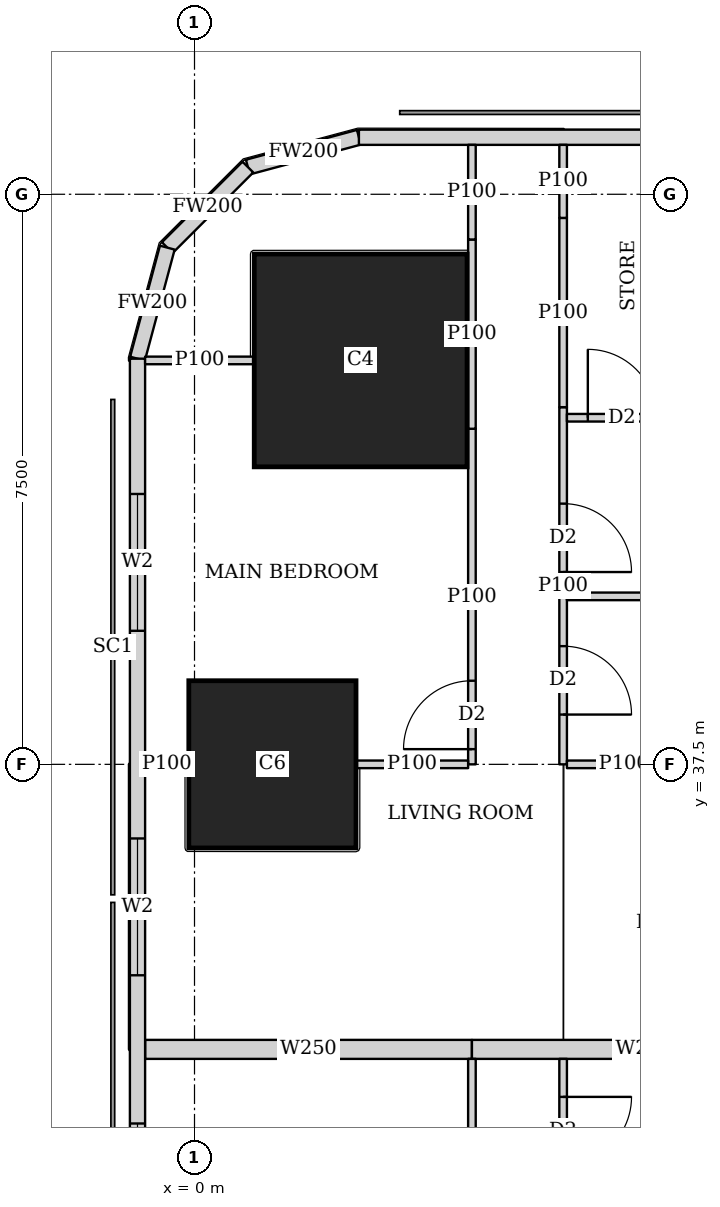
"""IFC4 building model, lengths in metres.
Left out: names, types, materials, properties, quantities, classifications, styles, units other than length and angle.
Written with IfcOpenShell. Run it as: python <this file> out.ifc"""

import sys

from ifc_helpers import new_model, si_unit, direction, frame, frame_2d, origin, origin_2d, place, context, subcontext, project, spatial, rectangle, extrude, element, fill, save


model = new_model("IFC4")
c1 = context("Model", 3, precision=1e-05, world=origin(), true_north=direction((0.0, 1.0)))
c2 = subcontext(c1, "Body", "Model", "MODEL_VIEW")
j1 = project(units=[si_unit("LENGTHUNIT", "METRE"), si_unit("PLANEANGLEUNIT", "RADIAN")], contexts=[c1])
p1 = place(None, origin())
s1 = spatial("IfcSite", under=j1, at=p1, CompositionType="ELEMENT")
p2 = place(p1, origin())
s2 = spatial("IfcBuilding", under=s1, at=p2, CompositionType="ELEMENT")
p3 = place(p2, frame((0.0, 0.0, 77.9)))
s3 = spatial("IfcBuildingStorey", under=s2, at=p3, CompositionType="ELEMENT", Elevation=77.9)
p4 = place(p3, frame((1.025, 37.5, 0.0), z_axis=(0.0, 0.0, 1.0), x_axis=(1.0, 0.0, 0.0)))
e1 = element("IfcColumn", 1, at=p4, inside=s3, PredefinedType="COLUMN", context=c2, shape_type="SweptSolid", body=[
    extrude(rectangle(XDim=2.2, YDim=2.2, at=origin_2d()), origin(), (0.0, 0.0, 1.0), 3.75),
])
p5 = place(p3, frame((2.186, 42.814, 0.0), z_axis=(0.0, 0.0, 1.0), x_axis=(1.0, 0.0, 0.0)))
e2 = element("IfcColumn", 2, at=p5, inside=s3, PredefinedType="COLUMN", context=c2, shape_type="SweptSolid", body=[
    extrude(rectangle(XDim=2.8, YDim=2.8, at=origin_2d()), origin(), (0.0, 0.0, 1.0), 3.75),
])
p6 = place(p3, frame((40.106, 45.75, 0.0), z_axis=(0.0, 0.0, 1.0), x_axis=(-1.0, 0.0, 0.0)))
e3 = element("IfcWall", 3, at=p6, inside=s3, PredefinedType="SOLIDWALL", context=c2, shape_type="SweptSolid", body=[
    extrude(rectangle(XDim=37.943, YDim=0.2, at=frame_2d((18.971, 0.0))), origin(), (0.0, 0.0, 1.0), 3.5),
])
p7 = place(p6, frame((8.606, 0.0, 0.9)))
e4 = element("IfcOpeningElement", 4, at=p7, cuts=e3, PredefinedType="OPENING", context=c2, shape_type="SweptSolid", body=[
    extrude(rectangle(XDim=1.8, YDim=1.5, at=frame_2d((0.9, 0.75))), frame((0.0, 0.11, 0.0), z_axis=(0.0, -1.0, 0.0), x_axis=(1.0, 0.0, 0.0)), (0.0, 0.0, 1.0), 0.22),
])
p8 = place(p6, frame((12.206, 0.0, 0.9)))
e5 = element("IfcOpeningElement", 5, at=p8, cuts=e3, PredefinedType="OPENING", context=c2, shape_type="SweptSolid", body=[
    extrude(rectangle(XDim=1.8, YDim=1.5, at=frame_2d((0.9, 0.75))), frame((0.0, 0.11, 0.0), z_axis=(0.0, -1.0, 0.0), x_axis=(1.0, 0.0, 0.0)), (0.0, 0.0, 1.0), 0.22),
])
p9 = place(p6, frame((15.806, 0.0, 0.9)))
e6 = element("IfcOpeningElement", 6, at=p9, cuts=e3, PredefinedType="OPENING", context=c2, shape_type="SweptSolid", body=[
    extrude(rectangle(XDim=1.8, YDim=1.5, at=frame_2d((0.9, 0.75))), frame((0.0, 0.11, 0.0), z_axis=(0.0, -1.0, 0.0), x_axis=(1.0, 0.0, 0.0)), (0.0, 0.0, 1.0), 0.22),
])
p10 = place(p6, frame((19.406, 0.0, 0.9)))
e7 = element("IfcOpeningElement", 7, at=p10, cuts=e3, PredefinedType="OPENING", context=c2, shape_type="SweptSolid", body=[
    extrude(rectangle(XDim=1.8, YDim=1.5, at=frame_2d((0.9, 0.75))), frame((0.0, 0.11, 0.0), z_axis=(0.0, -1.0, 0.0), x_axis=(1.0, 0.0, 0.0)), (0.0, 0.0, 1.0), 0.22),
])
p11 = place(p6, frame((23.006, 0.0, 0.9)))
e8 = element("IfcOpeningElement", 8, at=p11, cuts=e3, PredefinedType="OPENING", context=c2, shape_type="SweptSolid", body=[
    extrude(rectangle(XDim=1.8, YDim=1.5, at=frame_2d((0.9, 0.75))), frame((0.0, 0.11, 0.0), z_axis=(0.0, -1.0, 0.0), x_axis=(1.0, 0.0, 0.0)), (0.0, 0.0, 1.0), 0.22),
])
p12 = place(p6, frame((26.606, 0.0, 0.9)))
e9 = element("IfcOpeningElement", 9, at=p12, cuts=e3, PredefinedType="OPENING", context=c2, shape_type="SweptSolid", body=[
    extrude(rectangle(XDim=1.8, YDim=1.5, at=frame_2d((0.9, 0.75))), frame((0.0, 0.11, 0.0), z_axis=(0.0, -1.0, 0.0), x_axis=(1.0, 0.0, 0.0)), (0.0, 0.0, 1.0), 0.22),
])
p13 = place(p3, frame((2.163, 45.75, 0.0), z_axis=(0.0, 0.0, 1.0), x_axis=(-0.965832000415, -0.259168954497, 0.0)))
e10 = element("IfcWall", 10, at=p13, inside=s3, PredefinedType="SOLIDWALL", context=c2, shape_type="SweptSolid", body=[
    extrude(rectangle(XDim=1.513, YDim=0.2, at=frame_2d((0.756, 0.0))), origin(), (0.0, 0.0, 1.0), 3.5),
])
p14 = place(p3, frame((0.702, 45.358, 0.0), z_axis=(0.0, 0.0, 1.0), x_axis=(-0.707106781187, -0.707106781187, 0.0)))
e11 = element("IfcWall", 11, at=p14, inside=s3, PredefinedType="SOLIDWALL", context=c2, shape_type="SweptSolid", body=[
    extrude(rectangle(XDim=1.499, YDim=0.2, at=frame_2d((0.75, 0.0))), origin(), (0.0, 0.0, 1.0), 3.5),
])
p15 = place(p3, frame((-0.358, 44.298, 0.0), z_axis=(0.0, 0.0, 1.0), x_axis=(-0.259168954497, -0.965832000415, 0.0)))
e12 = element("IfcWall", 12, at=p15, inside=s3, PredefinedType="SOLIDWALL", context=c2, shape_type="SweptSolid", body=[
    extrude(rectangle(XDim=1.513, YDim=0.2, at=frame_2d((0.756, 0.0))), origin(), (0.0, 0.0, 1.0), 3.5),
])
p16 = place(p3, frame((-0.75, 42.837, 0.0), z_axis=(0.0, 0.0, 1.0), x_axis=(0.0, -1.0, 0.0)))
e13 = element("IfcWall", 13, at=p16, inside=s3, PredefinedType="SOLIDWALL", context=c2, shape_type="SweptSolid", body=[
    extrude(rectangle(XDim=40.674, YDim=0.2, at=frame_2d((20.337, 0.0))), origin(), (0.0, 0.0, 1.0), 3.5),
])
p17 = place(p16, frame((1.78, 0.0, 0.9)))
e14 = element("IfcOpeningElement", 14, at=p17, cuts=e13, PredefinedType="OPENING", context=c2, shape_type="SweptSolid", body=[
    extrude(rectangle(XDim=1.8, YDim=1.5, at=frame_2d((0.9, 0.75))), frame((0.0, 0.11, 0.0), z_axis=(0.0, -1.0, 0.0), x_axis=(1.0, 0.0, 0.0)), (0.0, 0.0, 1.0), 0.22),
])
p18 = place(p16, frame((6.312, 0.0, 0.9)))
e15 = element("IfcOpeningElement", 15, at=p18, cuts=e13, PredefinedType="OPENING", context=c2, shape_type="SweptSolid", body=[
    extrude(rectangle(XDim=1.8, YDim=1.5, at=frame_2d((0.9, 0.75))), frame((0.0, 0.11, 0.0), z_axis=(0.0, -1.0, 0.0), x_axis=(1.0, 0.0, 0.0)), (0.0, 0.0, 1.0), 0.22),
])
p19 = place(p16, frame((10.062, 0.0, 0.9)))
e16 = element("IfcOpeningElement", 16, at=p19, cuts=e13, PredefinedType="OPENING", context=c2, shape_type="SweptSolid", body=[
    extrude(rectangle(XDim=1.8, YDim=1.5, at=frame_2d((0.9, 0.75))), frame((0.0, 0.11, 0.0), z_axis=(0.0, -1.0, 0.0), x_axis=(1.0, 0.0, 0.0)), (0.0, 0.0, 1.0), 0.22),
])
p20 = place(p16, frame((13.812, 0.0, 0.9)))
e17 = element("IfcOpeningElement", 17, at=p20, cuts=e13, PredefinedType="OPENING", context=c2, shape_type="SweptSolid", body=[
    extrude(rectangle(XDim=1.8, YDim=1.5, at=frame_2d((0.9, 0.75))), frame((0.0, 0.11, 0.0), z_axis=(0.0, -1.0, 0.0), x_axis=(1.0, 0.0, 0.0)), (0.0, 0.0, 1.0), 0.22),
])
p21 = place(p16, frame((17.562, 0.0, 0.9)))
e18 = element("IfcOpeningElement", 18, at=p21, cuts=e13, PredefinedType="OPENING", context=c2, shape_type="SweptSolid", body=[
    extrude(rectangle(XDim=1.8, YDim=1.5, at=frame_2d((0.9, 0.75))), frame((0.0, 0.11, 0.0), z_axis=(0.0, -1.0, 0.0), x_axis=(1.0, 0.0, 0.0)), (0.0, 0.0, 1.0), 0.22),
])
p22 = place(p16, frame((21.312, 0.0, 0.9)))
e19 = element("IfcOpeningElement", 19, at=p22, cuts=e13, PredefinedType="OPENING", context=c2, shape_type="SweptSolid", body=[
    extrude(rectangle(XDim=1.8, YDim=1.5, at=frame_2d((0.9, 0.75))), frame((0.0, 0.11, 0.0), z_axis=(0.0, -1.0, 0.0), x_axis=(1.0, 0.0, 0.0)), (0.0, 0.0, 1.0), 0.22),
])
p23 = place(p16, frame((25.062, 0.0, 0.9)))
e20 = element("IfcOpeningElement", 20, at=p23, cuts=e13, PredefinedType="OPENING", context=c2, shape_type="SweptSolid", body=[
    extrude(rectangle(XDim=1.8, YDim=1.5, at=frame_2d((0.9, 0.75))), frame((0.0, 0.11, 0.0), z_axis=(0.0, -1.0, 0.0), x_axis=(1.0, 0.0, 0.0)), (0.0, 0.0, 1.0), 0.22),
])
p24 = place(p16, frame((28.812, 0.0, 0.9)))
e21 = element("IfcOpeningElement", 21, at=p24, cuts=e13, PredefinedType="OPENING", context=c2, shape_type="SweptSolid", body=[
    extrude(rectangle(XDim=1.8, YDim=1.5, at=frame_2d((0.9, 0.75))), frame((0.0, 0.11, 0.0), z_axis=(0.0, -1.0, 0.0), x_axis=(1.0, 0.0, 0.0)), (0.0, 0.0, 1.0), 0.22),
])
p25 = place(p16, frame((32.562, 0.0, 0.9)))
e22 = element("IfcOpeningElement", 22, at=p25, cuts=e13, PredefinedType="OPENING", context=c2, shape_type="SweptSolid", body=[
    extrude(rectangle(XDim=1.8, YDim=1.5, at=frame_2d((0.9, 0.75))), frame((0.0, 0.11, 0.0), z_axis=(0.0, -1.0, 0.0), x_axis=(1.0, 0.0, 0.0)), (0.0, 0.0, 1.0), 0.22),
])
p26 = place(p16, frame((37.094, 0.0, 0.9)))
e23 = element("IfcOpeningElement", 23, at=p26, cuts=e13, PredefinedType="OPENING", context=c2, shape_type="SweptSolid", body=[
    extrude(rectangle(XDim=1.8, YDim=1.5, at=frame_2d((0.9, 0.75))), frame((0.0, 0.11, 0.0), z_axis=(0.0, -1.0, 0.0), x_axis=(1.0, 0.0, 0.0)), (0.0, 0.0, 1.0), 0.22),
])
p27 = place(p3, frame((3.65, 26.25, 0.0), z_axis=(0.0, 0.0, 1.0), x_axis=(0.0, 1.0, 0.0)))
e24 = element("IfcWall", 24, at=p27, inside=s3, PredefinedType="PARTITIONING", context=c2, shape_type="SweptSolid", body=[
    extrude(rectangle(XDim=7.375, YDim=0.1, at=frame_2d((3.688, 0.0))), origin(), (0.0, 0.0, 1.0), 3.5),
])
p28 = place(p27, frame((0.2, 0.0, 0.0)))
e25 = element("IfcOpeningElement", 25, at=p28, cuts=e24, PredefinedType="OPENING", context=c2, shape_type="SweptSolid", body=[
    extrude(rectangle(XDim=0.9, YDim=2.1, at=frame_2d((0.45, 1.05))), frame((0.0, 0.06, 0.0), z_axis=(0.0, -1.0, 0.0), x_axis=(1.0, 0.0, 0.0)), (0.0, 0.0, 1.0), 0.12),
])
p29 = place(p27, frame((3.95, 0.0, 0.0)))
e26 = element("IfcOpeningElement", 26, at=p29, cuts=e24, PredefinedType="OPENING", context=c2, shape_type="SweptSolid", body=[
    extrude(rectangle(XDim=0.9, YDim=2.1, at=frame_2d((0.45, 1.05))), frame((0.0, 0.06, 0.0), z_axis=(0.0, -1.0, 0.0), x_axis=(1.0, 0.0, 0.0)), (0.0, 0.0, 1.0), 0.12),
])
p30 = place(p3, frame((4.85, 26.25, 0.0), z_axis=(0.0, 0.0, 1.0), x_axis=(0.0, 1.0, 0.0)))
e27 = element("IfcWall", 27, at=p30, inside=s3, PredefinedType="PARTITIONING", context=c2, shape_type="SweptSolid", body=[
    extrude(rectangle(XDim=7.375, YDim=0.1, at=frame_2d((3.688, 0.0))), origin(), (0.0, 0.0, 1.0), 3.5),
])
p31 = place(p30, frame((0.655, 0.0, 0.0)))
e28 = element("IfcOpeningElement", 28, at=p31, cuts=e27, PredefinedType="OPENING", context=c2, shape_type="SweptSolid", body=[
    extrude(rectangle(XDim=0.9, YDim=2.1, at=frame_2d((0.45, 1.05))), frame((0.0, 0.06, 0.0), z_axis=(0.0, -1.0, 0.0), x_axis=(1.0, 0.0, 0.0)), (0.0, 0.0, 1.0), 0.12),
])
p32 = place(p30, frame((4.1, 0.0, 0.0)))
e29 = element("IfcOpeningElement", 29, at=p32, cuts=e27, PredefinedType="OPENING", context=c2, shape_type="SweptSolid", body=[
    extrude(rectangle(XDim=0.9, YDim=2.1, at=frame_2d((0.45, 1.05))), frame((0.0, 0.06, 0.0), z_axis=(0.0, -1.0, 0.0), x_axis=(1.0, 0.0, 0.0)), (0.0, 0.0, 1.0), 0.12),
])
p33 = place(p30, frame((2.53, 0.0, 0.0)))
e30 = element("IfcOpeningElement", 30, at=p33, cuts=e27, PredefinedType="OPENING", context=c2, shape_type="SweptSolid", body=[
    extrude(rectangle(XDim=0.9, YDim=2.1, at=frame_2d((0.45, 1.05))), frame((0.0, 0.06, 0.0), z_axis=(0.0, -1.0, 0.0), x_axis=(1.0, 0.0, 0.0)), (0.0, 0.0, 1.0), 0.12),
])
p34 = place(p30, frame((5.975, 0.0, 0.0)))
e31 = element("IfcOpeningElement", 31, at=p34, cuts=e27, PredefinedType="OPENING", context=c2, shape_type="SweptSolid", body=[
    extrude(rectangle(XDim=0.9, YDim=2.1, at=frame_2d((0.45, 1.05))), frame((0.0, 0.06, 0.0), z_axis=(0.0, -1.0, 0.0), x_axis=(1.0, 0.0, 0.0)), (0.0, 0.0, 1.0), 0.12),
])
p35 = place(p3, frame((3.65, 37.5, 0.0), z_axis=(0.0, 0.0, 1.0), x_axis=(0.0, 1.0, 0.0)))
e32 = element("IfcWall", 32, at=p35, inside=s3, PredefinedType="PARTITIONING", context=c2, shape_type="SweptSolid", body=[
    extrude(rectangle(XDim=4.415, YDim=0.1, at=frame_2d((2.208, 0.0))), origin(), (0.0, 0.0, 1.0), 3.5),
])
p36 = place(p35, frame((0.2, 0.0, 0.0)))
e33 = element("IfcOpeningElement", 33, at=p36, cuts=e32, PredefinedType="OPENING", context=c2, shape_type="SweptSolid", body=[
    extrude(rectangle(XDim=0.9, YDim=2.1, at=frame_2d((0.45, 1.05))), frame((0.0, 0.06, 0.0), z_axis=(0.0, -1.0, 0.0), x_axis=(1.0, 0.0, 0.0)), (0.0, 0.0, 1.0), 0.12),
])
p37 = place(p3, frame((3.65, 41.915, 0.0), z_axis=(0.0, 0.0, 1.0), x_axis=(0.0, 1.0, 0.0)))
e34 = element("IfcWall", 34, at=p37, inside=s3, PredefinedType="PARTITIONING", context=c2, shape_type="SweptSolid", body=[
    extrude(rectangle(XDim=2.49, YDim=0.1, at=frame_2d((1.245, 0.0))), origin(), (0.0, 0.0, 1.0), 2.05),
])
p38 = place(p3, frame((3.65, 44.405, 0.0), z_axis=(0.0, 0.0, 1.0), x_axis=(0.0, 1.0, 0.0)))
e35 = element("IfcWall", 35, at=p38, inside=s3, PredefinedType="PARTITIONING", context=c2, shape_type="SweptSolid", body=[
    extrude(rectangle(XDim=1.245, YDim=0.1, at=frame_2d((0.623, 0.0))), origin(), (0.0, 0.0, 1.0), 3.5),
])
p39 = place(p3, frame((4.85, 37.5, 0.0), z_axis=(0.0, 0.0, 1.0), x_axis=(0.0, 1.0, 0.0)))
e36 = element("IfcWall", 36, at=p39, inside=s3, PredefinedType="PARTITIONING", context=c2, shape_type="SweptSolid", body=[
    extrude(rectangle(XDim=4.699, YDim=0.1, at=frame_2d((2.35, 0.0))), origin(), (0.0, 0.0, 1.0), 3.5),
])
p40 = place(p39, frame((0.655, 0.0, 0.0)))
e37 = element("IfcOpeningElement", 37, at=p40, cuts=e36, PredefinedType="OPENING", context=c2, shape_type="SweptSolid", body=[
    extrude(rectangle(XDim=0.9, YDim=2.1, at=frame_2d((0.45, 1.05))), frame((0.0, 0.06, 0.0), z_axis=(0.0, -1.0, 0.0), x_axis=(1.0, 0.0, 0.0)), (0.0, 0.0, 1.0), 0.12),
])
p41 = place(p39, frame((2.53, 0.0, 0.0)))
e38 = element("IfcOpeningElement", 38, at=p41, cuts=e36, PredefinedType="OPENING", context=c2, shape_type="SweptSolid", body=[
    extrude(rectangle(XDim=0.9, YDim=2.1, at=frame_2d((0.45, 1.05))), frame((0.0, 0.06, 0.0), z_axis=(0.0, -1.0, 0.0), x_axis=(1.0, 0.0, 0.0)), (0.0, 0.0, 1.0), 0.12),
])
p42 = place(p3, frame((4.85, 42.199, 0.0), z_axis=(0.0, 0.0, 1.0), x_axis=(0.0, 1.0, 0.0)))
e39 = element("IfcWall", 39, at=p42, inside=s3, PredefinedType="PARTITIONING", context=c2, shape_type="SweptSolid", body=[
    extrude(rectangle(XDim=2.49, YDim=0.1, at=frame_2d((1.245, 0.0))), origin(), (0.0, 0.0, 1.0), 2.05),
])
p43 = place(p3, frame((4.85, 44.689, 0.0), z_axis=(0.0, 0.0, 1.0), x_axis=(0.0, 1.0, 0.0)))
e40 = element("IfcWall", 40, at=p43, inside=s3, PredefinedType="PARTITIONING", context=c2, shape_type="SweptSolid", body=[
    extrude(rectangle(XDim=0.961, YDim=0.1, at=frame_2d((0.48, 0.0))), origin(), (0.0, 0.0, 1.0), 3.5),
])
p44 = place(p3, frame((-0.65, 37.5, 0.0), z_axis=(0.0, 0.0, 1.0), x_axis=(1.0, 0.0, 0.0)))
e41 = element("IfcWall", 41, at=p44, inside=s3, PredefinedType="PARTITIONING", context=c2, shape_type="SweptSolid", body=[
    extrude(rectangle(XDim=0.574, YDim=0.1, at=frame_2d((0.287, 0.0))), origin(), (0.0, 0.0, 1.0), 2.05),
])
p45 = place(p3, frame((2.126, 37.5, 0.0), z_axis=(0.0, 0.0, 1.0), x_axis=(1.0, 0.0, 0.0)))
e42 = element("IfcWall", 42, at=p45, inside=s3, PredefinedType="PARTITIONING", context=c2, shape_type="SweptSolid", body=[
    extrude(rectangle(XDim=1.474, YDim=0.1, at=frame_2d((0.737, 0.0))), origin(), (0.0, 0.0, 1.0), 2.05),
])
p46 = place(p3, frame((-0.65, 42.814, 0.0), z_axis=(0.0, 0.0, 1.0), x_axis=(1.0, 0.0, 0.0)))
e43 = element("IfcWall", 43, at=p46, inside=s3, PredefinedType="PARTITIONING", context=c2, shape_type="SweptSolid", body=[
    extrude(rectangle(XDim=1.435, YDim=0.1, at=frame_2d((0.717, 0.0))), origin(), (0.0, 0.0, 1.0), 3.5),
])
p47 = place(p3, frame((4.9, 37.5, 0.0), z_axis=(0.0, 0.0, 1.0), x_axis=(1.0, 0.0, 0.0)))
e44 = element("IfcWall", 44, at=p47, inside=s3, PredefinedType="PARTITIONING", context=c2, shape_type="SweptSolid", body=[
    extrude(rectangle(XDim=1.499, YDim=0.1, at=frame_2d((0.75, 0.0))), origin(), (0.0, 0.0, 1.0), 3.5),
])
p48 = place(p3, frame((4.9, 39.71, 0.0), z_axis=(0.0, 0.0, 1.0), x_axis=(1.0, 0.0, 0.0)))
e45 = element("IfcWall", 45, at=p48, inside=s3, PredefinedType="PARTITIONING", context=c2, shape_type="SweptSolid", body=[
    extrude(rectangle(XDim=3.275, YDim=0.1, at=frame_2d((1.638, 0.0))), origin(), (0.0, 0.0, 1.0), 3.5),
])
p49 = place(p3, frame((-0.65, 33.75, 0.0), z_axis=(0.0, 0.0, 1.0), x_axis=(1.0, 0.0, 0.0)))
e46 = element("IfcWall", 46, at=p49, inside=s3, PredefinedType="SOLIDWALL", context=c2, shape_type="SweptSolid", body=[
    extrude(rectangle(XDim=4.3, YDim=0.25, at=frame_2d((2.15, 0.0))), origin(), (0.0, 0.0, 1.0), 2.2),
])
p50 = place(p3, frame((3.65, 33.75, 0.0), z_axis=(0.0, 0.0, 1.0), x_axis=(1.0, 0.0, 0.0)))
e47 = element("IfcWall", 47, at=p50, inside=s3, PredefinedType="SOLIDWALL", context=c2, shape_type="SweptSolid", body=[
    extrude(rectangle(XDim=4.525, YDim=0.25, at=frame_2d((2.263, 0.0))), origin(), (0.0, 0.0, 1.0), 3.5),
])
p51 = place(p3, frame((8.175, 42.06, 0.0), z_axis=(0.0, 0.0, 1.0), x_axis=(-1.0, 0.0, 0.0)))
e48 = element("IfcWall", 48, at=p51, inside=s3, PredefinedType="PARTITIONING", context=c2, shape_type="SweptSolid", body=[
    extrude(rectangle(XDim=3.275, YDim=0.1, at=frame_2d((1.638, 0.0))), origin(), (0.0, 0.0, 1.0), 3.5),
])
p52 = place(p51, frame((2.1, 0.0, 0.0)))
e49 = element("IfcOpeningElement", 49, at=p52, cuts=e48, PredefinedType="OPENING", context=c2, shape_type="SweptSolid", body=[
    extrude(rectangle(XDim=0.9, YDim=2.1, at=frame_2d((0.45, 1.05))), frame((0.0, 0.06, 0.0), z_axis=(0.0, -1.0, 0.0), x_axis=(1.0, 0.0, 0.0)), (0.0, 0.0, 1.0), 0.12),
])
p53 = place(p17, origin())
e50 = element("IfcWindow", 50, at=p53, inside=s3, PartitioningType="SINGLE_PANEL", PredefinedType="WINDOW", context=c2, shape_type="SweptSolid", body=[
    extrude(rectangle(XDim=1.8, YDim=1.5, at=frame_2d((0.9, 0.75))), frame((0.0, 0.03, 0.0), z_axis=(0.0, -1.0, 0.0), x_axis=(1.0, 0.0, 0.0)), (0.0, 0.0, 1.0), 0.06),
])
fill(e14, e50)
p54 = place(p18, origin())
e51 = element("IfcWindow", 51, at=p54, inside=s3, PartitioningType="SINGLE_PANEL", PredefinedType="WINDOW", context=c2, shape_type="SweptSolid", body=[
    extrude(rectangle(XDim=1.8, YDim=1.5, at=frame_2d((0.9, 0.75))), frame((0.0, 0.03, 0.0), z_axis=(0.0, -1.0, 0.0), x_axis=(1.0, 0.0, 0.0)), (0.0, 0.0, 1.0), 0.06),
])
fill(e15, e51)
p55 = place(p19, origin())
e52 = element("IfcWindow", 52, at=p55, inside=s3, PartitioningType="SINGLE_PANEL", PredefinedType="WINDOW", context=c2, shape_type="SweptSolid", body=[
    extrude(rectangle(XDim=1.8, YDim=1.5, at=frame_2d((0.9, 0.75))), frame((0.0, 0.03, 0.0), z_axis=(0.0, -1.0, 0.0), x_axis=(1.0, 0.0, 0.0)), (0.0, 0.0, 1.0), 0.06),
])
fill(e16, e52)
p56 = place(p34, origin())
e53 = element("IfcDoor", 53, at=p56, inside=s3, OperationType="SINGLE_SWING_LEFT", PredefinedType="DOOR", context=c2, shape_type="SweptSolid", body=[
    extrude(rectangle(XDim=0.9, YDim=2.1, at=frame_2d((0.45, 1.05))), frame((0.0, 0.025, 0.0), z_axis=(0.0, -1.0, 0.0), x_axis=(1.0, 0.0, 0.0)), (0.0, 0.0, 1.0), 0.05),
])
fill(e31, e53)
p57 = place(p36, origin())
e54 = element("IfcDoor", 54, at=p57, inside=s3, OperationType="SINGLE_SWING_LEFT", PredefinedType="DOOR", context=c2, shape_type="SweptSolid", body=[
    extrude(rectangle(XDim=0.9, YDim=2.1, at=frame_2d((0.45, 1.05))), frame((0.0, 0.025, 0.0), z_axis=(0.0, -1.0, 0.0), x_axis=(1.0, 0.0, 0.0)), (0.0, 0.0, 1.0), 0.05),
])
fill(e33, e54)
p58 = place(p40, origin())
e55 = element("IfcDoor", 55, at=p58, inside=s3, OperationType="SINGLE_SWING_RIGHT", PredefinedType="DOOR", context=c2, shape_type="SweptSolid", body=[
    extrude(rectangle(XDim=0.9, YDim=2.1, at=frame_2d((0.45, 1.05))), frame((0.0, 0.025, 0.0), z_axis=(0.0, -1.0, 0.0), x_axis=(1.0, 0.0, 0.0)), (0.0, 0.0, 1.0), 0.05),
])
fill(e37, e55)
p59 = place(p41, origin())
e56 = element("IfcDoor", 56, at=p59, inside=s3, OperationType="SINGLE_SWING_RIGHT", PredefinedType="DOOR", context=c2, shape_type="SweptSolid", body=[
    extrude(rectangle(XDim=0.9, YDim=2.1, at=frame_2d((0.45, 1.05))), frame((0.0, 0.025, 0.0), z_axis=(0.0, -1.0, 0.0), x_axis=(1.0, 0.0, 0.0)), (0.0, 0.0, 1.0), 0.05),
])
fill(e38, e56)
p60 = place(p52, origin())
e57 = element("IfcDoor", 57, at=p60, inside=s3, OperationType="SINGLE_SWING_LEFT", PredefinedType="DOOR", context=c2, shape_type="SweptSolid", body=[
    extrude(rectangle(XDim=0.9, YDim=2.1, at=frame_2d((0.45, 1.05))), frame((0.0, 0.025, 0.0), z_axis=(0.0, -1.0, 0.0), x_axis=(1.0, 0.0, 0.0)), (0.0, 0.0, 1.0), 0.05),
])
fill(e49, e57)
save(model, sys.argv[1])
